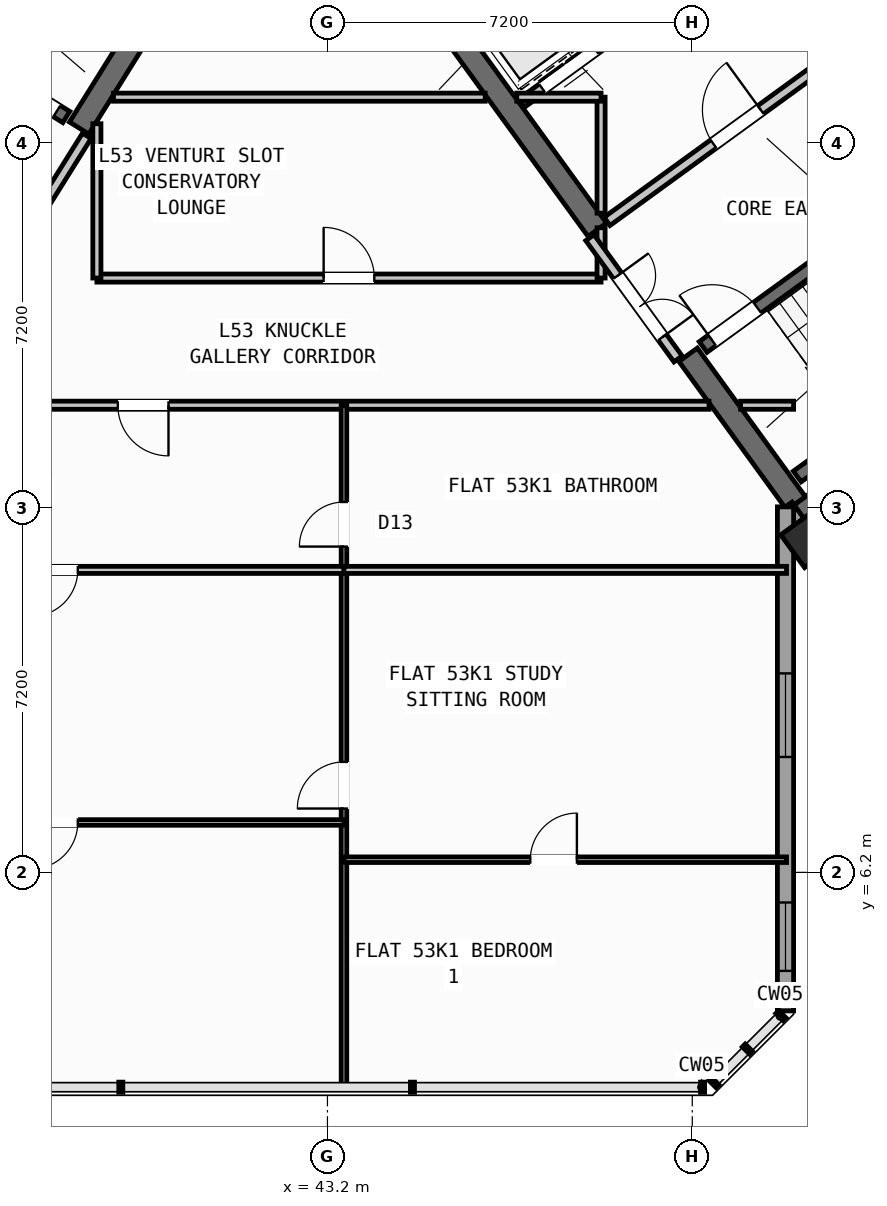
"""IFC4 building model, lengths in metres.
Left out: names, types, materials, properties, quantities, classifications, styles, units other than length and angle.
Written with IfcOpenShell. Run it as: python <this file> out.ifc"""

import sys

from ifc_helpers import new_model, si_unit, direction, frame, frame_2d, origin, origin_2d, place, context, subcontext, project, spatial, rectangle, hollow_rectangle, extrude, source, transform, mapped, element, fill, save


model = new_model("IFC4")
c1 = context("Model", 3, precision=1e-05, world=origin(), true_north=direction((0.0, 1.0)))
c2 = subcontext(c1, "Body", "Model", "MODEL_VIEW")
j1 = project(units=[si_unit("LENGTHUNIT", "METRE"), si_unit("PLANEANGLEUNIT", "RADIAN")], contexts=[c1])
p1 = place(None, origin())
s1 = spatial("IfcSite", under=j1, at=p1, CompositionType="ELEMENT")
p2 = place(p1, origin())
s2 = spatial("IfcBuilding", under=s1, at=p2, CompositionType="ELEMENT")
p3 = place(p2, frame((0.0, 0.0, 211.2)))
s3 = spatial("IfcBuildingStorey", under=s2, at=p3, CompositionType="ELEMENT", Elevation=211.2)
p4 = place(p3, frame((40.221, 23.965, 0.0), z_axis=(0.0, 0.0, 1.0), x_axis=(-0.529902075036, -0.848058836916, 0.0)))
e1 = element("IfcWall", 1, at=p4, inside=s3, PredefinedType="SHEAR", context=c2, shape_type="SweptSolid", body=[
    extrude(rectangle(XDim=3.625, YDim=0.45, at=frame_2d((1.812, 0.0))), origin(), (0.0, 0.0, 1.0), 3.35),
])
p5 = place(p3, frame((52.399, 13.169, 0.0), z_axis=(0.0, 0.0, 1.0), x_axis=(0.809022352778, 0.587777877013, 0.0)))
e2 = element("IfcWall", 2, at=p5, inside=s3, PredefinedType="SHEAR", context=c2, shape_type="SweptSolid", body=[
    extrude(rectangle(XDim=12.24, YDim=0.45, at=frame_2d((6.12, 0.0))), origin(), (0.0, 0.0, 1.0), 3.35),
])
p6 = place(p3, frame((52.449, 13.483, 0.0), z_axis=(0.0, 0.0, 1.0), x_axis=(-0.587819244441, 0.808992296542, 0.0)))
e3 = element("IfcWall", 3, at=p6, inside=s3, PredefinedType="SHEAR", context=c2, shape_type="SweptSolid", body=[
    extrude(rectangle(XDim=3.625, YDim=0.45, at=frame_2d((1.812, 0.0))), origin(), (0.0, 0.0, 1.0), 3.35),
])
p7 = place(p3, frame((48.526, 18.884, 0.0), z_axis=(0.0, 0.0, 1.0), x_axis=(-0.587774812919, 0.809024578921, 0.0)))
e4 = element("IfcWall", 4, at=p7, inside=s3, PredefinedType="SHEAR", context=c2, shape_type="SweptSolid", body=[
    extrude(rectangle(XDim=6.475, YDim=0.45, at=frame_2d((3.238, 0.0))), origin(), (0.0, 0.0, 1.0), 3.35),
])
m1 = source(origin(), c2, "Body", "SweptSolid", [
    extrude(hollow_rectangle(XDim=0.8, YDim=0.8, WallThickness=0.032, at=origin_2d()), origin(), (0.0, 0.0, 1.0), 3.6),
])
p8 = place(p3, frame((52.705, 12.773, 0.0), z_axis=(0.0, 0.0, 1.0), x_axis=(0.809016994375, 0.587785252292, 0.0)))
e5 = element("IfcColumn", 5, at=p8, inside=s3, PredefinedType="COLUMN", context=c2, shape_type="MappedRepresentation", body=[
    mapped(m1, transform((0.0, 0.0, 0.0), scale=1.0)),
])
p9 = place(p3, frame((52.937, 12.455, 0.0), z_axis=(0.0, 0.0, 1.0), x_axis=(-0.587706324018, 0.809074333241, 0.0)))
e6 = element("IfcWall", 6, at=p9, inside=s3, PredefinedType="STANDARD", context=c2, shape_type="SweptSolid", body=[
    extrude(rectangle(XDim=1.186, YDim=0.32, at=frame_2d((0.593, 0.0))), origin(), (0.0, 0.0, 1.0), 3.35),
])
p10 = place(p3, frame((52.24, 13.414, 0.0), z_axis=(0.0, 0.0, 1.0), x_axis=(0.0, -1.0, 0.0)))
e7 = element("IfcWall", 7, at=p10, inside=s3, PredefinedType="STANDARD", context=c2, shape_type="SweptSolid", body=[
    extrude(rectangle(XDim=9.948, YDim=0.32, at=frame_2d((4.974, 0.0))), origin(), (0.0, 0.0, 1.0), 3.35),
])
p11 = place(p10, frame((3.287, 0.0, 0.9)))
e8 = element("IfcOpeningElement", 8, at=p11, cuts=e7, PredefinedType="OPENING", context=c2, shape_type="SweptSolid", body=[
    extrude(rectangle(XDim=1.65, YDim=1.45, at=frame_2d((0.825, 0.725))), frame((0.0, 0.17, 0.0), z_axis=(0.0, -1.0, 0.0), x_axis=(1.0, 0.0, 0.0)), (0.0, 0.0, 1.0), 0.34),
])
p12 = place(p10, frame((7.808, 0.0, 0.9)))
e9 = element("IfcOpeningElement", 9, at=p12, cuts=e7, PredefinedType="OPENING", context=c2, shape_type="SweptSolid", body=[
    extrude(rectangle(XDim=1.35, YDim=1.45, at=frame_2d((0.675, 0.725))), frame((0.0, 0.17, 0.0), z_axis=(0.0, -1.0, 0.0), x_axis=(1.0, 0.0, 0.0)), (0.0, 0.0, 1.0), 0.34),
])
p13 = place(p3, frame((38.046, 21.108, 0.0), z_axis=(0.0, 0.0, 1.0), x_axis=(-0.848054434086, 0.529909121291, 0.0)))
e10 = element("IfcWall", 10, at=p13, inside=s3, PredefinedType="SHEAR", context=c2, shape_type="SweptSolid", body=[
    extrude(rectangle(XDim=7.33, YDim=0.26, at=frame_2d((3.665, 0.0))), origin(), (0.0, 0.0, 1.0), 3.35),
])
p14 = place(p13, frame((0.22, 0.0, 0.0)))
e11 = element("IfcOpeningElement", 11, at=p14, cuts=e10, PredefinedType="OPENING", context=c2, shape_type="SweptSolid", body=[
    extrude(rectangle(XDim=1.1, YDim=2.1, at=frame_2d((0.55, 1.05))), frame((0.0, 0.14, 0.0), z_axis=(0.0, -1.0, 0.0), x_axis=(1.0, 0.0, 0.0)), (0.0, 0.0, 1.0), 0.28),
])
p15 = place(p3, frame((52.472, 14.013, 0.0), z_axis=(0.0, 0.0, 1.0), x_axis=(0.809028366311, 0.587769599847, 0.0)))
e12 = element("IfcWall", 12, at=p15, inside=s3, PredefinedType="SHEAR", context=c2, shape_type="SweptSolid", body=[
    extrude(rectangle(XDim=7.33, YDim=0.26, at=frame_2d((3.665, 0.0))), origin(), (0.0, 0.0, 1.0), 3.35),
])
p16 = place(p3, frame((50.615, 16.57, 0.0), z_axis=(0.0, 0.0, 1.0), x_axis=(0.809028366311, 0.587769599847, 0.0)))
e13 = element("IfcWall", 13, at=p16, inside=s3, PredefinedType="SHEAR", context=c2, shape_type="SweptSolid", body=[
    extrude(rectangle(XDim=7.33, YDim=0.26, at=frame_2d((3.665, 0.0))), origin(), (0.0, 0.0, 1.0), 3.35),
])
p17 = place(p16, frame((0.22, 0.0, 0.0)))
e14 = element("IfcOpeningElement", 14, at=p17, cuts=e13, PredefinedType="OPENING", context=c2, shape_type="SweptSolid", body=[
    extrude(rectangle(XDim=1.1, YDim=2.1, at=frame_2d((0.55, 1.05))), frame((0.0, 0.14, 0.0), z_axis=(0.0, -1.0, 0.0), x_axis=(1.0, 0.0, 0.0)), (0.0, 0.0, 1.0), 0.28),
])
p18 = place(p3, frame((47.025, 21.378, 0.0), z_axis=(0.0, 0.0, 1.0), x_axis=(0.809052869724, 0.587735870941, 0.0)))
e15 = element("IfcWall", 15, at=p18, inside=s3, PredefinedType="STANDARD", context=c2, shape_type="SweptSolid", body=[
    extrude(rectangle(XDim=3.498, YDim=0.2, at=frame_2d((1.749, 0.0))), origin(), (0.0, 0.0, 1.0), 3.34),
])
p19 = place(p18, frame((0.508, 0.0, 0.0)))
e16 = element("IfcOpeningElement", 16, at=p19, cuts=e15, PredefinedType="OPENING", context=c2, shape_type="SweptSolid", body=[
    extrude(rectangle(XDim=1.3, YDim=2.2, at=frame_2d((0.65, 1.1))), frame((0.0, 0.11, 0.0), z_axis=(0.0, -1.0, 0.0), x_axis=(1.0, 0.0, 0.0)), (0.0, 0.0, 1.0), 0.22),
])
p20 = place(p3, frame((48.718, 19.048, 0.0), z_axis=(0.0, 0.0, 1.0), x_axis=(0.809017261719, 0.587784884325, 0.0)))
e17 = element("IfcWall", 17, at=p20, inside=s3, PredefinedType="STANDARD", context=c2, shape_type="SweptSolid", body=[
    extrude(rectangle(XDim=5.818, YDim=0.2, at=frame_2d((2.909, 0.0))), origin(), (0.0, 0.0, 1.0), 3.34),
])
p21 = place(p20, frame((2.598, 0.0, 0.0)))
e18 = element("IfcOpeningElement", 18, at=p21, cuts=e17, PredefinedType="OPENING", context=c2, shape_type="SweptSolid", body=[
    extrude(rectangle(XDim=1.15, YDim=2.1, at=frame_2d((0.575, 1.05))), frame((0.0, 0.11, 0.0), z_axis=(0.0, -1.0, 0.0), x_axis=(1.0, 0.0, 0.0)), (0.0, 0.0, 1.0), 0.22),
])
p22 = place(p3, frame((38.451, 20.737, 0.0), z_axis=(0.0, 0.0, 1.0), x_axis=(-0.529924799939, -0.848044637038, 0.0)))
e19 = element("IfcWall", 19, at=p22, inside=s3, PredefinedType="STANDARD", context=c2, shape_type="SweptSolid", body=[
    extrude(rectangle(XDim=2.96, YDim=0.2, at=frame_2d((1.48, 0.0))), origin(), (0.0, 0.0, 1.0), 3.34),
])
p23 = place(p22, frame((1.46, 0.0, 0.0)))
e20 = element("IfcOpeningElement", 20, at=p23, cuts=e19, PredefinedType="OPENING", context=c2, shape_type="SweptSolid", body=[
    extrude(rectangle(XDim=0.86, YDim=2.05, at=frame_2d((0.43, 1.025))), frame((0.0, 0.11, 0.0), z_axis=(0.0, -1.0, 0.0), x_axis=(1.0, 0.0, 0.0)), (0.0, 0.0, 1.0), 0.22),
])
p24 = place(p3, frame((35.178, 15.42, 0.0), z_axis=(0.0, 0.0, 1.0), x_axis=(1.0, 0.0, 0.0)))
e21 = element("IfcWall", 21, at=p24, inside=s3, PredefinedType="PARTITIONING", context=c2, shape_type="SweptSolid", body=[
    extrude(rectangle(XDim=15.552, YDim=0.16, at=frame_2d((7.776, 0.0))), origin(), (0.0, 0.0, 1.0), 3.34),
])
p25 = place(p24, frame((3.885, 0.0, 0.0)))
e22 = element("IfcOpeningElement", 22, at=p25, cuts=e21, PredefinedType="OPENING", context=c2, shape_type="SweptSolid", body=[
    extrude(rectangle(XDim=1.0, YDim=2.1, at=frame_2d((0.5, 1.05))), frame((0.0, 0.09, 0.0), z_axis=(0.0, -1.0, 0.0), x_axis=(1.0, 0.0, 0.0)), (0.0, 0.0, 1.0), 0.18),
])
p26 = place(p3, frame((51.354, 15.42, 0.0), z_axis=(0.0, 0.0, 1.0), x_axis=(1.0, 0.0, 0.0)))
e23 = element("IfcWall", 23, at=p26, inside=s3, PredefinedType="PARTITIONING", context=c2, shape_type="SweptSolid", body=[
    extrude(rectangle(XDim=1.046, YDim=0.16, at=frame_2d((0.523, 0.0))), origin(), (0.0, 0.0, 1.0), 3.34),
])
p27 = place(p3, frame((38.65, 17.93, 0.0), z_axis=(0.0, 0.0, 1.0), x_axis=(1.0, 0.0, 0.0)))
e24 = element("IfcWall", 24, at=p27, inside=s3, PredefinedType="PARTITIONING", context=c2, shape_type="SweptSolid", body=[
    extrude(rectangle(XDim=9.95, YDim=0.16, at=frame_2d((4.975, 0.0))), origin(), (0.0, 0.0, 1.0), 3.34),
])
p28 = place(p27, frame((4.475, 0.0, 0.0)))
e25 = element("IfcOpeningElement", 25, at=p28, cuts=e24, PredefinedType="OPENING", context=c2, shape_type="SweptSolid", body=[
    extrude(rectangle(XDim=1.0, YDim=2.1, at=frame_2d((0.5, 1.05))), frame((0.0, 0.09, 0.0), z_axis=(0.0, -1.0, 0.0), x_axis=(1.0, 0.0, 0.0)), (0.0, 0.0, 1.0), 0.18),
])
p29 = place(p3, frame((38.65, 17.93, 0.0), z_axis=(0.0, 0.0, 1.0), x_axis=(0.0, 1.0, 0.0)))
e26 = element("IfcWall", 26, at=p29, inside=s3, PredefinedType="PARTITIONING", context=c2, shape_type="SweptSolid", body=[
    extrude(rectangle(XDim=3.046, YDim=0.16, at=frame_2d((1.523, 0.0))), origin(), (0.0, 0.0, 1.0), 3.34),
])
p30 = place(p3, frame((48.6, 17.93, 0.0), z_axis=(0.0, 0.0, 1.0), x_axis=(0.0, 1.0, 0.0)))
e27 = element("IfcWall", 27, at=p30, inside=s3, PredefinedType="PARTITIONING", context=c2, shape_type="SweptSolid", body=[
    extrude(rectangle(XDim=0.993, YDim=0.16, at=frame_2d((0.496, 0.0))), origin(), (0.0, 0.0, 1.0), 3.34),
])
p31 = place(p3, frame((48.6, 19.21, 0.0), z_axis=(0.0, 0.0, 1.0), x_axis=(0.0, 1.0, 0.0)))
e28 = element("IfcWall", 28, at=p31, inside=s3, PredefinedType="PARTITIONING", context=c2, shape_type="SweptSolid", body=[
    extrude(rectangle(XDim=2.29, YDim=0.16, at=frame_2d((1.145, 0.0))), origin(), (0.0, 0.0, 1.0), 3.34),
])
p32 = place(p3, frame((38.978, 21.5, 0.0), z_axis=(0.0, 0.0, 1.0), x_axis=(1.0, 0.0, 0.0)))
e29 = element("IfcWall", 29, at=p32, inside=s3, PredefinedType="PARTITIONING", context=c2, shape_type="SweptSolid", body=[
    extrude(rectangle(XDim=7.336, YDim=0.16, at=frame_2d((3.668, 0.0))), origin(), (0.0, 0.0, 1.0), 3.34),
])
p33 = place(p3, frame((46.936, 21.5, 0.0), z_axis=(0.0, 0.0, 1.0), x_axis=(1.0, 0.0, 0.0)))
e30 = element("IfcWall", 30, at=p33, inside=s3, PredefinedType="PARTITIONING", context=c2, shape_type="SweptSolid", body=[
    extrude(rectangle(XDim=1.664, YDim=0.16, at=frame_2d((0.832, 0.0))), origin(), (0.0, 0.0, 1.0), 3.34),
])
p34 = place(p3, frame((50.119, 16.333, 0.0), z_axis=(0.0, 0.0, 1.0), x_axis=(-0.587749856981, 0.809042709391, 0.0)))
e31 = element("IfcWall", 31, at=p34, inside=s3, PredefinedType="STANDARD", context=c2, shape_type="SweptSolid", body=[
    extrude(rectangle(XDim=2.96, YDim=0.2, at=frame_2d((1.48, 0.0))), origin(), (0.0, 0.0, 1.0), 3.34),
])
p35 = place(p34, frame((0.53, 0.0, 0.0)))
e32 = element("IfcOpeningElement", 32, at=p35, cuts=e31, PredefinedType="OPENING", context=c2, shape_type="SweptSolid", body=[
    extrude(rectangle(XDim=1.5, YDim=2.15, at=frame_2d((0.75, 1.075))), frame((0.0, 0.11, 0.0), z_axis=(0.0, -1.0, 0.0), x_axis=(1.0, 0.0, 0.0)), (0.0, 0.0, 1.0), 0.22),
])
p36 = place(p3, frame((43.526, 1.96, 0.0), z_axis=(0.0, 0.0, 1.0), x_axis=(0.0, 1.0, 0.0)))
e33 = element("IfcWall", 33, at=p36, inside=s3, PredefinedType="PARTITIONING", context=c2, shape_type="SweptSolid", body=[
    extrude(rectangle(XDim=13.46, YDim=0.11, at=frame_2d((6.73, 0.0))), origin(), (0.0, 0.0, 1.0), 3.34),
])
p37 = place(p36, frame((5.5, 0.0, 0.0)))
e34 = element("IfcOpeningElement", 34, at=p37, cuts=e33, PredefinedType="OPENING", context=c2, shape_type="SweptSolid", body=[
    extrude(rectangle(XDim=0.92, YDim=2.08, at=frame_2d((0.46, 1.04))), frame((0.0, 0.065, 0.0), z_axis=(0.0, -1.0, 0.0), x_axis=(1.0, 0.0, 0.0)), (0.0, 0.0, 1.0), 0.13),
])
p38 = place(p36, frame((10.67, 0.0, 0.0)))
e35 = element("IfcOpeningElement", 35, at=p38, cuts=e33, PredefinedType="OPENING", context=c2, shape_type="SweptSolid", body=[
    extrude(rectangle(XDim=0.88, YDim=2.08, at=frame_2d((0.44, 1.04))), frame((0.0, 0.065, 0.0), z_axis=(0.0, -1.0, 0.0), x_axis=(1.0, 0.0, 0.0)), (0.0, 0.0, 1.0), 0.13),
])
p39 = place(p3, frame((33.584, 12.17, 0.0), z_axis=(0.0, 0.0, 1.0), x_axis=(1.0, 0.0, 0.0)))
e36 = element("IfcWall", 36, at=p39, inside=s3, PredefinedType="PLUMBINGWALL", context=c2, shape_type="SweptSolid", body=[
    extrude(rectangle(XDim=9.942, YDim=0.14, at=frame_2d((4.971, 0.0))), origin(), (0.0, 0.0, 1.0), 2.525),
])
p40 = place(p39, frame((3.769, 0.0, 0.0)))
e37 = element("IfcOpeningElement", 37, at=p40, cuts=e36, PredefinedType="OPENING", context=c2, shape_type="SweptSolid", body=[
    extrude(rectangle(XDim=0.92, YDim=2.08, at=frame_2d((0.46, 1.04))), frame((0.0, 0.08, 0.0), z_axis=(0.0, -1.0, 0.0), x_axis=(1.0, 0.0, 0.0)), (0.0, 0.0, 1.0), 0.16),
])
p41 = place(p3, frame((43.526, 12.17, 0.0), z_axis=(0.0, 0.0, 1.0), x_axis=(1.0, 0.0, 0.0)))
e38 = element("IfcWall", 38, at=p41, inside=s3, PredefinedType="PLUMBINGWALL", context=c2, shape_type="SweptSolid", body=[
    extrude(rectangle(XDim=8.734, YDim=0.14, at=frame_2d((4.367, 0.0))), origin(), (0.0, 0.0, 1.0), 2.525),
])
p42 = place(p3, frame((31.74, 7.185, 0.0), z_axis=(0.0, 0.0, 1.0), x_axis=(1.0, 0.0, 0.0)))
e39 = element("IfcWall", 39, at=p42, inside=s3, PredefinedType="PARTITIONING", context=c2, shape_type="SweptSolid", body=[
    extrude(rectangle(XDim=11.786, YDim=0.11, at=frame_2d((5.893, 0.0))), origin(), (0.0, 0.0, 1.0), 3.34),
])
p43 = place(p42, frame((5.613, 0.0, 0.0)))
e40 = element("IfcOpeningElement", 40, at=p43, cuts=e39, PredefinedType="OPENING", context=c2, shape_type="SweptSolid", body=[
    extrude(rectangle(XDim=0.92, YDim=2.08, at=frame_2d((0.46, 1.04))), frame((0.0, 0.065, 0.0), z_axis=(0.0, -1.0, 0.0), x_axis=(1.0, 0.0, 0.0)), (0.0, 0.0, 1.0), 0.13),
])
p44 = place(p3, frame((43.526, 6.45, 0.0), z_axis=(0.0, 0.0, 1.0), x_axis=(1.0, 0.0, 0.0)))
e41 = element("IfcWall", 41, at=p44, inside=s3, PredefinedType="PARTITIONING", context=c2, shape_type="SweptSolid", body=[
    extrude(rectangle(XDim=8.734, YDim=0.11, at=frame_2d((4.367, 0.0))), origin(), (0.0, 0.0, 1.0), 3.34),
])
p45 = place(p44, frame((3.677, 0.0, 0.0)))
e42 = element("IfcOpeningElement", 42, at=p45, cuts=e41, PredefinedType="OPENING", context=c2, shape_type="SweptSolid", body=[
    extrude(rectangle(XDim=0.92, YDim=2.08, at=frame_2d((0.46, 1.04))), frame((0.0, 0.065, 0.0), z_axis=(0.0, -1.0, 0.0), x_axis=(1.0, 0.0, 0.0)), (0.0, 0.0, 1.0), 0.13),
])
m2 = source(origin(), c2, "Body", "SweptSolid", [
    extrude(rectangle(XDim=1.65, YDim=1.45, at=frame_2d((0.825, 0.725))), frame((0.0, 0.03, 0.0), z_axis=(0.0, -1.0, 0.0), x_axis=(1.0, 0.0, 0.0)), (0.0, 0.0, 1.0), 0.06),
])
p46 = place(p11, origin())
e43 = element("IfcWindow", 43, at=p46, inside=s3, PartitioningType="SINGLE_PANEL", PredefinedType="WINDOW", context=c2, shape_type="MappedRepresentation", body=[
    mapped(m2, transform((0.0, 0.0, 0.0), scale=1.0)),
])
fill(e8, e43)
m3 = source(origin(), c2, "Body", "SweptSolid", [
    extrude(rectangle(XDim=1.35, YDim=1.45, at=frame_2d((0.675, 0.725))), frame((0.0, 0.03, 0.0), z_axis=(0.0, -1.0, 0.0), x_axis=(1.0, 0.0, 0.0)), (0.0, 0.0, 1.0), 0.06),
])
p47 = place(p12, origin())
e44 = element("IfcWindow", 44, at=p47, inside=s3, PartitioningType="SINGLE_PANEL", PredefinedType="WINDOW", context=c2, shape_type="MappedRepresentation", body=[
    mapped(m3, transform((0.0, 0.0, 0.0), scale=1.0)),
])
fill(e9, e44)
m4 = source(origin(), c2, "Body", "SweptSolid", [
    extrude(rectangle(XDim=1.1, YDim=2.1, at=frame_2d((0.55, 1.05))), frame((0.0, 0.025, 0.0), z_axis=(0.0, -1.0, 0.0), x_axis=(1.0, 0.0, 0.0)), (0.0, 0.0, 1.0), 0.05),
])
p48 = place(p14, origin())
e45 = element("IfcDoor", 45, at=p48, inside=s3, OperationType="SINGLE_SWING_RIGHT", PredefinedType="DOOR", context=c2, shape_type="MappedRepresentation", body=[
    mapped(m4, transform((0.0, 0.0, 0.0), scale=1.0)),
])
fill(e11, e45)
p49 = place(p17, origin())
e46 = element("IfcDoor", 46, at=p49, inside=s3, OperationType="SINGLE_SWING_LEFT", PredefinedType="DOOR", context=c2, shape_type="MappedRepresentation", body=[
    mapped(m4, transform((0.0, 0.0, 0.0), scale=1.0)),
])
fill(e14, e46)
m5 = source(origin(), c2, "Body", "SweptSolid", [
    extrude(rectangle(XDim=1.15, YDim=2.1, at=frame_2d((0.575, 1.05))), frame((0.0, 0.025, 0.0), z_axis=(0.0, -1.0, 0.0), x_axis=(1.0, 0.0, 0.0)), (0.0, 0.0, 1.0), 0.05),
])
p50 = place(p21, origin())
e47 = element("IfcDoor", 47, at=p50, inside=s3, OperationType="SINGLE_SWING_RIGHT", PredefinedType="DOOR", context=c2, shape_type="MappedRepresentation", body=[
    mapped(m5, transform((0.0, 0.0, 0.0), scale=1.0)),
])
fill(e18, e47)
m6 = source(origin(), c2, "Body", "SweptSolid", [
    extrude(rectangle(XDim=1.3, YDim=2.2, at=frame_2d((0.65, 1.1))), frame((0.0, 0.025, 0.0), z_axis=(0.0, -1.0, 0.0), x_axis=(1.0, 0.0, 0.0)), (0.0, 0.0, 1.0), 0.05),
])
p51 = place(p19, origin())
e48 = element("IfcDoor", 48, at=p51, inside=s3, OperationType="DOUBLE_DOOR_SLIDING", PredefinedType="DOOR", context=c2, shape_type="MappedRepresentation", body=[
    mapped(m6, transform((0.0, 0.0, 0.0), scale=1.0)),
])
fill(e16, e48)
m7 = source(origin(), c2, "Body", "SweptSolid", [
    extrude(rectangle(XDim=1.0, YDim=2.1, at=frame_2d((0.5, 1.05))), frame((0.0, 0.025, 0.0), z_axis=(0.0, -1.0, 0.0), x_axis=(1.0, 0.0, 0.0)), (0.0, 0.0, 1.0), 0.05),
])
p52 = place(p28, origin())
e49 = element("IfcDoor", 49, at=p52, inside=s3, OperationType="SINGLE_SWING_LEFT", PredefinedType="DOOR", context=c2, shape_type="MappedRepresentation", body=[
    mapped(m7, transform((0.0, 0.0, 0.0), scale=1.0)),
])
fill(e25, e49)
m8 = source(origin(), c2, "Body", "SweptSolid", [
    extrude(rectangle(XDim=1.5, YDim=2.15, at=frame_2d((0.75, 1.075))), frame((0.0, 0.025, 0.0), z_axis=(0.0, -1.0, 0.0), x_axis=(1.0, 0.0, 0.0)), (0.0, 0.0, 1.0), 0.05),
])
p53 = place(p35, frame((1.5, 0.0, 0.0), z_axis=(0.0, 0.0, 1.0), x_axis=(-1.0, 0.0, 0.0)))
e50 = element("IfcDoor", 50, at=p53, inside=s3, OperationType="DOUBLE_DOOR_SINGLE_SWING", PredefinedType="DOOR", context=c2, shape_type="MappedRepresentation", body=[
    mapped(m8, transform((0.0, 0.0, 0.0), scale=1.0)),
])
fill(e32, e50)
m9 = source(origin(), c2, "Body", "SweptSolid", [
    extrude(rectangle(XDim=0.92, YDim=2.08, at=frame_2d((0.46, 1.04))), frame((0.0, 0.025, 0.0), z_axis=(0.0, -1.0, 0.0), x_axis=(1.0, 0.0, 0.0)), (0.0, 0.0, 1.0), 0.05),
])
p54 = place(p43, frame((0.92, 0.0, 0.0), z_axis=(0.0, 0.0, 1.0), x_axis=(-1.0, 0.0, 0.0)))
e51 = element("IfcDoor", 51, at=p54, inside=s3, OperationType="SINGLE_SWING_RIGHT", PredefinedType="DOOR", context=c2, shape_type="MappedRepresentation", body=[
    mapped(m9, transform((0.0, 0.0, 0.0), scale=1.0)),
])
fill(e40, e51)
p55 = place(p37, origin())
e52 = element("IfcDoor", 52, at=p55, inside=s3, OperationType="SINGLE_SWING_LEFT", PredefinedType="DOOR", context=c2, shape_type="MappedRepresentation", body=[
    mapped(m9, transform((0.0, 0.0, 0.0), scale=1.0)),
])
fill(e34, e52)
p56 = place(p45, origin())
e53 = element("IfcDoor", 53, at=p56, inside=s3, OperationType="SINGLE_SWING_RIGHT", PredefinedType="DOOR", context=c2, shape_type="MappedRepresentation", body=[
    mapped(m9, transform((0.0, 0.0, 0.0), scale=1.0)),
])
fill(e42, e53)
p57 = place(p25, frame((1.0, 0.0, 0.0), z_axis=(0.0, 0.0, 1.0), x_axis=(-1.0, 0.0, 0.0)))
e54 = element("IfcDoor", 54, at=p57, inside=s3, OperationType="SINGLE_SWING_LEFT", PredefinedType="DOOR", context=c2, shape_type="MappedRepresentation", body=[
    mapped(m7, transform((0.0, 0.0, 0.0), scale=1.0)),
])
fill(e22, e54)
p58 = place(p40, frame((0.92, 0.0, 0.0), z_axis=(0.0, 0.0, 1.0), x_axis=(-1.0, 0.0, 0.0)))
e55 = element("IfcDoor", 55, at=p58, inside=s3, OperationType="SINGLE_SWING_RIGHT", PredefinedType="DOOR", context=c2, shape_type="MappedRepresentation", body=[
    mapped(m9, transform((0.0, 0.0, 0.0), scale=1.0)),
])
fill(e37, e55)
m10 = source(origin(), c2, "Body", "SweptSolid", [
    extrude(rectangle(XDim=0.88, YDim=2.08, at=frame_2d((0.44, 1.04))), frame((0.0, 0.025, 0.0), z_axis=(0.0, -1.0, 0.0), x_axis=(1.0, 0.0, 0.0)), (0.0, 0.0, 1.0), 0.05),
])
p59 = place(p38, origin())
e56 = element("IfcDoor", 56, at=p59, inside=s3, OperationType="SINGLE_SWING_LEFT", PredefinedType="DOOR", context=c2, shape_type="MappedRepresentation", body=[
    mapped(m10, transform((0.0, 0.0, 0.0), scale=1.0)),
])
fill(e35, e56)
save(model, sys.argv[1])
